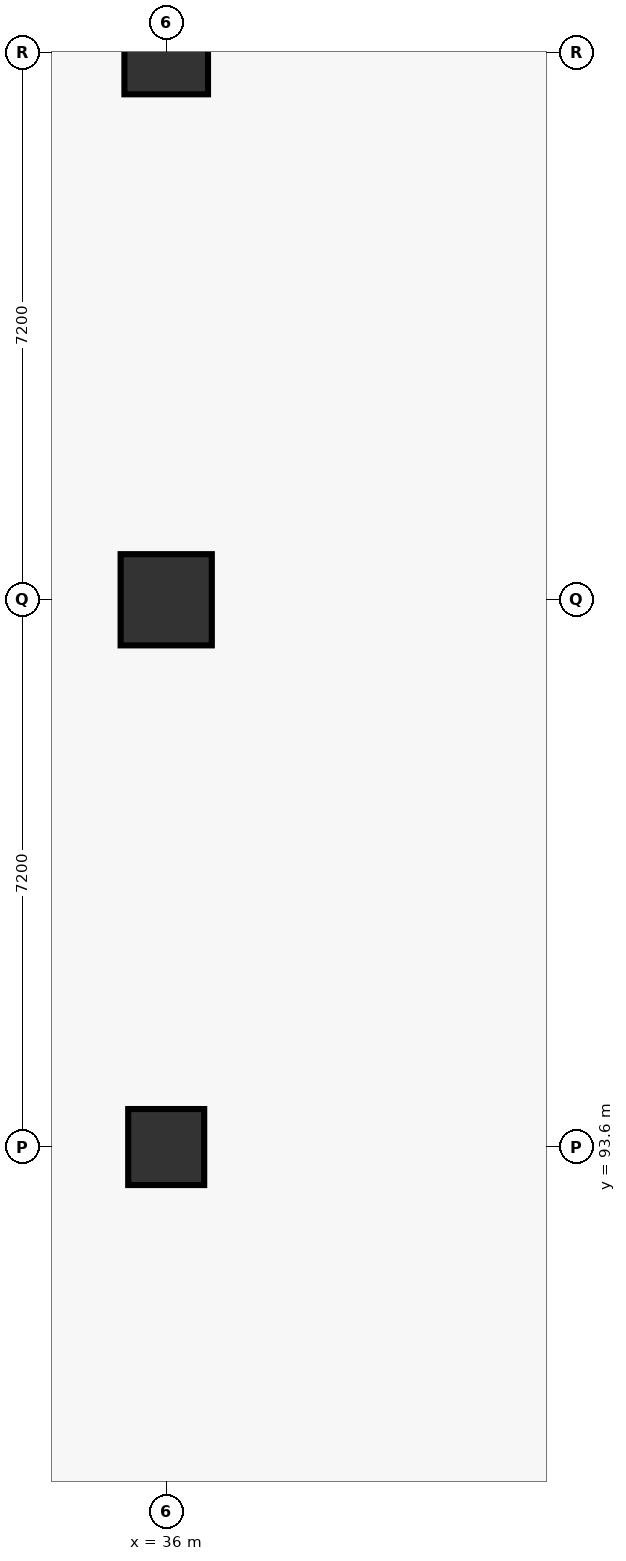
"""IFC4 building model, lengths in metres.
Left out: names, types, materials, properties, quantities, classifications, styles, units other than length and angle.
Written with IfcOpenShell. Run it as: python <this file> out.ifc"""

import sys

from ifc_helpers import new_model, si_unit, direction, frame, origin, origin_2d, place, context, subcontext, project, spatial, rectangle, circle, extrude, element, save


model = new_model("IFC4")
c1 = context("Model", 3, precision=1e-05, world=origin(), true_north=direction((0.0, 1.0)))
c2 = subcontext(c1, "Body", "Model", "MODEL_VIEW")
j1 = project(units=[si_unit("LENGTHUNIT", "METRE"), si_unit("PLANEANGLEUNIT", "RADIAN")], contexts=[c1])
p1 = place(None, origin())
s1 = spatial("IfcSite", under=j1, at=p1, CompositionType="ELEMENT")
p2 = place(p1, origin())
s2 = spatial("IfcBuilding", under=s1, at=p2, CompositionType="ELEMENT")
p3 = place(p2, frame((0.0, 0.0, -5.4)))
s3 = spatial("IfcBuildingStorey", under=s2, at=p3, CompositionType="ELEMENT", Elevation=-5.4)
p4 = place(p3, frame((36.0, 93.6, 0.0), z_axis=(0.0, 0.0, 1.0), x_axis=(1.0, 0.0, 0.0)))
e1 = element("IfcColumn", 1, at=p4, inside=s3, PredefinedType="COLUMN", context=c2, shape_type="SweptSolid", body=[
    extrude(rectangle(XDim=1.0, YDim=1.0, at=origin_2d()), origin(), (0.0, 0.0, 1.0), 5.4),
])
p5 = place(p3, frame((36.0, 100.8, 0.0), z_axis=(0.0, 0.0, 1.0), x_axis=(1.0, 0.0, 0.0)))
e2 = element("IfcColumn", 2, at=p5, inside=s3, PredefinedType="COLUMN", context=c2, shape_type="SweptSolid", body=[
    extrude(circle(Radius=0.6, at=origin_2d()), origin(), (0.0, 0.0, 1.0), 5.4),
])
p6 = place(p3, frame((36.0, 108.0, 0.0), z_axis=(0.0, 0.0, 1.0), x_axis=(1.0, 0.0, 0.0)))
e3 = element("IfcColumn", 3, at=p6, inside=s3, PredefinedType="COLUMN", context=c2, shape_type="SweptSolid", body=[
    extrude(rectangle(XDim=1.1, YDim=1.1, at=origin_2d()), origin(), (0.0, 0.0, 1.0), 5.4),
])
save(model, sys.argv[1])
